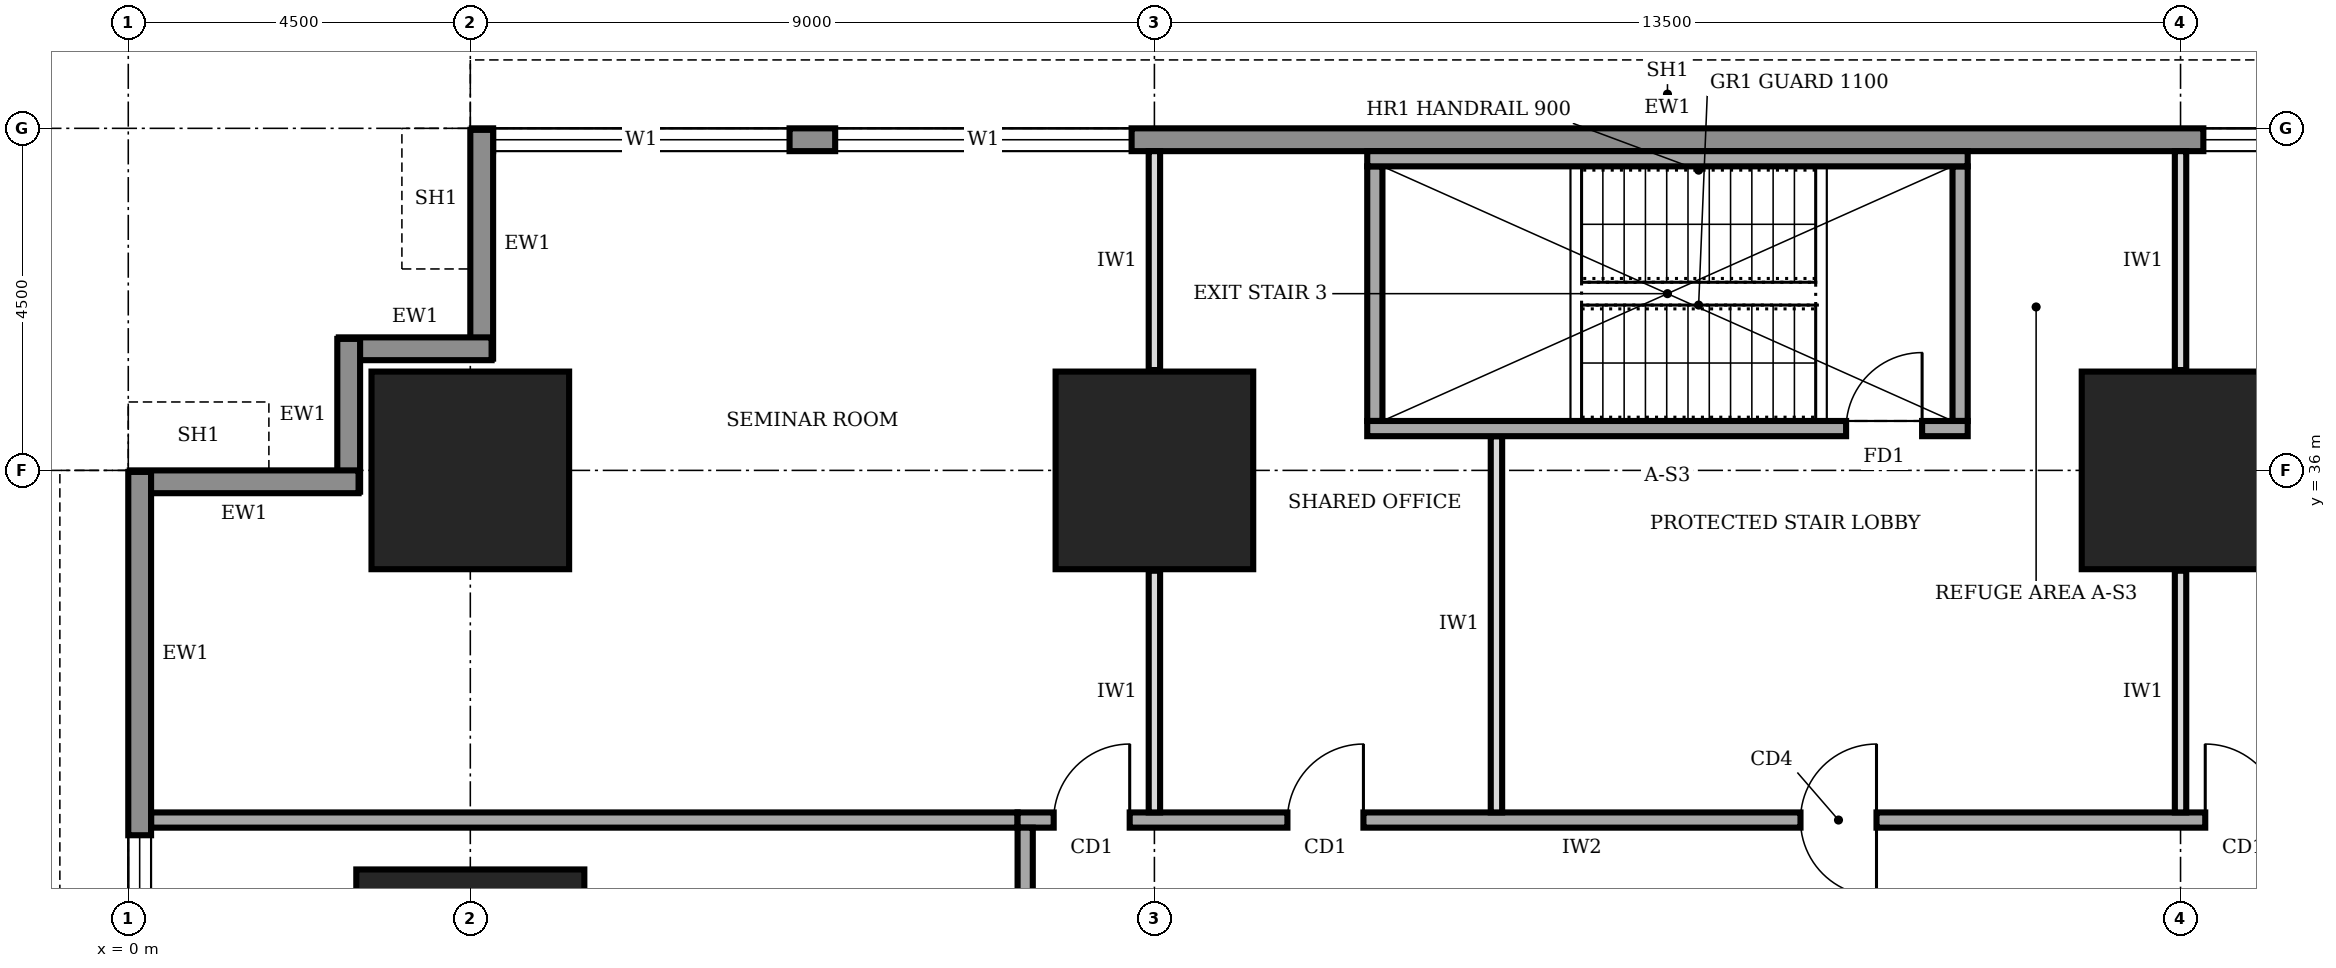
"""IFC4 building model, lengths in metres.
Left out: names, types, materials, properties, quantities, classifications, styles, units other than length and angle.
Written with IfcOpenShell. Run it as: python <this file> out.ifc"""

import sys

from ifc_helpers import new_model, si_unit, direction, frame, frame_2d, origin, origin_2d, place, context, subcontext, project, spatial, rectangle, extrude, element, fill, save


model = new_model("IFC4")
c1 = context("Model", 3, precision=1e-05, world=origin(), true_north=direction((0.0, 1.0)))
c2 = subcontext(c1, "Body", "Model", "MODEL_VIEW")
j1 = project(units=[si_unit("LENGTHUNIT", "METRE"), si_unit("PLANEANGLEUNIT", "RADIAN")], contexts=[c1])
p1 = place(None, origin())
s1 = spatial("IfcSite", under=j1, at=p1, CompositionType="ELEMENT")
p2 = place(p1, origin())
s2 = spatial("IfcBuilding", under=s1, at=p2, CompositionType="ELEMENT")
p3 = place(p2, frame((0.0, 0.0, 29.0)))
s3 = spatial("IfcBuildingStorey", under=s2, at=p3, CompositionType="ELEMENT", Elevation=29.0)
p4 = place(p3, frame((4.5, 29.25, 0.0), z_axis=(0.0, 0.0, 1.0), x_axis=(1.0, 0.0, 0.0)))
e1 = element("IfcColumn", 1, at=p4, inside=s3, PredefinedType="COLUMN", context=c2, shape_type="SweptSolid", body=[
    extrude(rectangle(XDim=3.0, YDim=3.0, at=origin_2d()), origin(), (0.0, 0.0, 1.0), 4.0),
])
for number, where, z_axis, x_axis in (
    (2, (4.5, 36.0, 0.0), (0.0, 0.0, 1.0), (1.0, 0.0, 0.0)),
    (3, (13.5, 36.0, 0.0), (0.0, 0.0, 1.0), (1.0, 0.0, 0.0)),
    (4, (27.0, 36.0, 0.0), (0.0, 0.0, 1.0), (1.0, 0.0, 0.0)),
):
    element("IfcColumn", number, at=place(p3, frame(where, z_axis=z_axis, x_axis=x_axis)), inside=s3, PredefinedType="COLUMN", context=c2, shape_type="SweptSolid", body=[
        extrude(rectangle(XDim=2.6, YDim=2.6, at=origin_2d()), origin(), (0.0, 0.0, 1.0), 4.0),
    ])
p5 = place(p3, frame((35.98, 40.35, 0.0), z_axis=(0.0, 0.0, 1.0), x_axis=(-1.0, 0.0, 0.0)))
e5 = element("IfcWall", 5, at=p5, inside=s3, PredefinedType="STANDARD", context=c2, shape_type="SweptSolid", body=[
    extrude(rectangle(XDim=31.46, YDim=0.3, at=frame_2d((15.73, 0.0))), origin(), (0.0, 0.0, 1.0), 3.75),
])
p6 = place(p5, frame((27.28, 0.0, 0.9)))
e6 = element("IfcOpeningElement", 6, at=p6, cuts=e5, PredefinedType="OPENING", context=c2, shape_type="SweptSolid", body=[
    extrude(rectangle(XDim=3.9, YDim=2.2, at=frame_2d((1.95, 1.1))), frame((0.0, 0.16, 0.0), z_axis=(0.0, -1.0, 0.0), x_axis=(1.0, 0.0, 0.0)), (0.0, 0.0, 1.0), 0.32),
])
p7 = place(p5, frame((22.78, 0.0, 0.9)))
e7 = element("IfcOpeningElement", 7, at=p7, cuts=e5, PredefinedType="OPENING", context=c2, shape_type="SweptSolid", body=[
    extrude(rectangle(XDim=3.9, YDim=2.2, at=frame_2d((1.95, 1.1))), frame((0.0, 0.16, 0.0), z_axis=(0.0, -1.0, 0.0), x_axis=(1.0, 0.0, 0.0)), (0.0, 0.0, 1.0), 0.32),
])
p8 = place(p5, frame((4.78, 0.0, 0.9)))
e8 = element("IfcOpeningElement", 8, at=p8, cuts=e5, PredefinedType="OPENING", context=c2, shape_type="SweptSolid", body=[
    extrude(rectangle(XDim=3.9, YDim=2.2, at=frame_2d((1.95, 1.1))), frame((0.0, 0.16, 0.0), z_axis=(0.0, -1.0, 0.0), x_axis=(1.0, 0.0, 0.0)), (0.0, 0.0, 1.0), 0.32),
])
p9 = place(p3, frame((4.65, 40.48, 0.0), z_axis=(0.0, 0.0, 1.0), x_axis=(0.0, -1.0, 0.0)))
e9 = element("IfcWall", 9, at=p9, inside=s3, PredefinedType="STANDARD", context=c2, shape_type="SweptSolid", body=[
    extrude(rectangle(XDim=3.01, YDim=0.3, at=frame_2d((1.505, 0.0))), origin(), (0.0, 0.0, 1.0), 2.85),
])
for number, where, z_axis, x_axis in (
    (10, (4.78, 37.6, 0.0), (0.0, 0.0, 1.0), (-1.0, 0.0, 0.0)),
    (11, (2.9, 37.73, 0.0), (0.0, 0.0, 1.0), (0.0, -1.0, 0.0)),
):
    element("IfcWall", number, at=place(p3, frame(where, z_axis=z_axis, x_axis=x_axis)), inside=s3, PredefinedType="STANDARD", context=c2, shape_type="SweptSolid", body=[
        extrude(rectangle(XDim=2.01, YDim=0.3, at=frame_2d((1.005, 0.0))), origin(), (0.0, 0.0, 1.0), 3.75),
    ])
p10 = place(p3, frame((3.03, 35.85, 0.0), z_axis=(0.0, 0.0, 1.0), x_axis=(-1.0, 0.0, 0.0)))
e12 = element("IfcWall", 12, at=p10, inside=s3, PredefinedType="STANDARD", context=c2, shape_type="SweptSolid", body=[
    extrude(rectangle(XDim=3.01, YDim=0.3, at=frame_2d((1.505, 0.0))), origin(), (0.0, 0.0, 1.0), 2.85),
])
p11 = place(p3, frame((0.15, 35.98, 0.0), z_axis=(0.0, 0.0, 1.0), x_axis=(0.0, -1.0, 0.0)))
e13 = element("IfcWall", 13, at=p11, inside=s3, PredefinedType="STANDARD", context=c2, shape_type="SweptSolid", body=[
    extrude(rectangle(XDim=31.46, YDim=0.3, at=frame_2d((15.73, 0.0))), origin(), (0.0, 0.0, 1.0), 3.75),
])
p12 = place(p11, frame((27.28, 0.0, 0.9)))
e14 = element("IfcOpeningElement", 14, at=p12, cuts=e13, PredefinedType="OPENING", context=c2, shape_type="SweptSolid", body=[
    extrude(rectangle(XDim=3.9, YDim=2.2, at=frame_2d((1.95, 1.1))), frame((0.0, 0.16, 0.0), z_axis=(0.0, -1.0, 0.0), x_axis=(1.0, 0.0, 0.0)), (0.0, 0.0, 1.0), 0.32),
])
p13 = place(p11, frame((22.78, 0.0, 0.9)))
e15 = element("IfcOpeningElement", 15, at=p13, cuts=e13, PredefinedType="OPENING", context=c2, shape_type="SweptSolid", body=[
    extrude(rectangle(XDim=3.9, YDim=2.2, at=frame_2d((1.95, 1.1))), frame((0.0, 0.16, 0.0), z_axis=(0.0, -1.0, 0.0), x_axis=(1.0, 0.0, 0.0)), (0.0, 0.0, 1.0), 0.32),
])
p14 = place(p11, frame((18.28, 0.0, 0.9)))
e16 = element("IfcOpeningElement", 16, at=p14, cuts=e13, PredefinedType="OPENING", context=c2, shape_type="SweptSolid", body=[
    extrude(rectangle(XDim=3.9, YDim=2.2, at=frame_2d((1.95, 1.1))), frame((0.0, 0.16, 0.0), z_axis=(0.0, -1.0, 0.0), x_axis=(1.0, 0.0, 0.0)), (0.0, 0.0, 1.0), 0.32),
])
p15 = place(p11, frame((13.78, 0.0, 0.9)))
e17 = element("IfcOpeningElement", 17, at=p15, cuts=e13, PredefinedType="OPENING", context=c2, shape_type="SweptSolid", body=[
    extrude(rectangle(XDim=3.9, YDim=2.2, at=frame_2d((1.95, 1.1))), frame((0.0, 0.16, 0.0), z_axis=(0.0, -1.0, 0.0), x_axis=(1.0, 0.0, 0.0)), (0.0, 0.0, 1.0), 0.32),
])
p16 = place(p11, frame((9.28, 0.0, 0.9)))
e18 = element("IfcOpeningElement", 18, at=p16, cuts=e13, PredefinedType="OPENING", context=c2, shape_type="SweptSolid", body=[
    extrude(rectangle(XDim=3.9, YDim=2.2, at=frame_2d((1.95, 1.1))), frame((0.0, 0.16, 0.0), z_axis=(0.0, -1.0, 0.0), x_axis=(1.0, 0.0, 0.0)), (0.0, 0.0, 1.0), 0.32),
])
p17 = place(p11, frame((4.78, 0.0, 0.9)))
e19 = element("IfcOpeningElement", 19, at=p17, cuts=e13, PredefinedType="OPENING", context=c2, shape_type="SweptSolid", body=[
    extrude(rectangle(XDim=3.9, YDim=2.2, at=frame_2d((1.95, 1.1))), frame((0.0, 0.16, 0.0), z_axis=(0.0, -1.0, 0.0), x_axis=(1.0, 0.0, 0.0)), (0.0, 0.0, 1.0), 0.32),
])
p18 = place(p3, frame((28.6, 31.4, 0.0), z_axis=(0.0, 0.0, 1.0), x_axis=(-1.0, 0.0, 0.0)))
e20 = element("IfcWall", 20, at=p18, inside=s3, PredefinedType="SOLIDWALL", context=c2, shape_type="SweptSolid", body=[
    extrude(rectangle(XDim=16.9, YDim=0.2, at=frame_2d((8.45, 0.0))), origin(), (0.0, 0.0, 1.0), 3.75),
])
p19 = place(p18, frame((15.425, 0.0, 0.0)))
e21 = element("IfcOpeningElement", 21, at=p19, cuts=e20, PredefinedType="OPENING", context=c2, shape_type="SweptSolid", body=[
    extrude(rectangle(XDim=1.0, YDim=2.1, at=frame_2d((0.5, 1.05))), frame((0.0, 0.11, 0.0), z_axis=(0.0, -1.0, 0.0), x_axis=(1.0, 0.0, 0.0)), (0.0, 0.0, 1.0), 0.22),
])
p20 = place(p18, frame((12.35, 0.0, 0.0)))
e22 = element("IfcOpeningElement", 22, at=p20, cuts=e20, PredefinedType="OPENING", context=c2, shape_type="SweptSolid", body=[
    extrude(rectangle(XDim=1.0, YDim=2.1, at=frame_2d((0.5, 1.05))), frame((0.0, 0.11, 0.0), z_axis=(0.0, -1.0, 0.0), x_axis=(1.0, 0.0, 0.0)), (0.0, 0.0, 1.0), 0.22),
])
p21 = place(p18, frame((5.6, 0.0, 0.0)))
e23 = element("IfcOpeningElement", 23, at=p21, cuts=e20, PredefinedType="OPENING", context=c2, shape_type="SweptSolid", body=[
    extrude(rectangle(XDim=1.0, YDim=2.1, at=frame_2d((0.5, 1.05))), frame((0.0, 0.11, 0.0), z_axis=(0.0, -1.0, 0.0), x_axis=(1.0, 0.0, 0.0)), (0.0, 0.0, 1.0), 0.22),
])
p22 = place(p18, frame((0.275, 0.0, 0.0)))
e24 = element("IfcOpeningElement", 24, at=p22, cuts=e20, PredefinedType="OPENING", context=c2, shape_type="SweptSolid", body=[
    extrude(rectangle(XDim=1.0, YDim=2.1, at=frame_2d((0.5, 1.05))), frame((0.0, 0.11, 0.0), z_axis=(0.0, -1.0, 0.0), x_axis=(1.0, 0.0, 0.0)), (0.0, 0.0, 1.0), 0.22),
])
p23 = place(p3, frame((11.8, 31.3, 0.0), z_axis=(0.0, 0.0, 1.0), x_axis=(0.0, -1.0, 0.0)))
e25 = element("IfcWall", 25, at=p23, inside=s3, PredefinedType="SOLIDWALL", context=c2, shape_type="SweptSolid", body=[
    extrude(rectangle(XDim=23.8, YDim=0.2, at=frame_2d((11.9, 0.0))), origin(), (0.0, 0.0, 1.0), 3.75),
])
p24 = place(p23, frame((20.3, 0.0, 0.0)))
e26 = element("IfcOpeningElement", 26, at=p24, cuts=e25, PredefinedType="OPENING", context=c2, shape_type="SweptSolid", body=[
    extrude(rectangle(XDim=1.0, YDim=2.1, at=frame_2d((0.5, 1.05))), frame((0.0, 0.11, 0.0), z_axis=(0.0, -1.0, 0.0), x_axis=(1.0, 0.0, 0.0)), (0.0, 0.0, 1.0), 0.22),
])
p25 = place(p23, frame((16.2, 0.0, 0.0)))
e27 = element("IfcOpeningElement", 27, at=p25, cuts=e25, PredefinedType="OPENING", context=c2, shape_type="SweptSolid", body=[
    extrude(rectangle(XDim=1.0, YDim=2.1, at=frame_2d((0.5, 1.05))), frame((0.0, 0.11, 0.0), z_axis=(0.0, -1.0, 0.0), x_axis=(1.0, 0.0, 0.0)), (0.0, 0.0, 1.0), 0.22),
])
p26 = place(p23, frame((13.2, 0.0, 0.0)))
e28 = element("IfcOpeningElement", 28, at=p26, cuts=e25, PredefinedType="OPENING", context=c2, shape_type="SweptSolid", body=[
    extrude(rectangle(XDim=0.9, YDim=2.1, at=frame_2d((0.45, 1.05))), frame((0.0, 0.11, 0.0), z_axis=(0.0, -1.0, 0.0), x_axis=(1.0, 0.0, 0.0)), (0.0, 0.0, 1.0), 0.22),
])
p27 = place(p23, frame((10.15, 0.0, 0.0)))
e29 = element("IfcOpeningElement", 29, at=p27, cuts=e25, PredefinedType="OPENING", context=c2, shape_type="SweptSolid", body=[
    extrude(rectangle(XDim=0.9, YDim=2.1, at=frame_2d((0.45, 1.05))), frame((0.0, 0.11, 0.0), z_axis=(0.0, -1.0, 0.0), x_axis=(1.0, 0.0, 0.0)), (0.0, 0.0, 1.0), 0.22),
])
p28 = place(p23, frame((5.45, 0.0, 0.0)))
e30 = element("IfcOpeningElement", 30, at=p28, cuts=e25, PredefinedType="OPENING", context=c2, shape_type="SweptSolid", body=[
    extrude(rectangle(XDim=0.9, YDim=2.1, at=frame_2d((0.45, 1.05))), frame((0.0, 0.11, 0.0), z_axis=(0.0, -1.0, 0.0), x_axis=(1.0, 0.0, 0.0)), (0.0, 0.0, 1.0), 0.22),
])
p29 = place(p23, frame((8.0, 0.0, 0.0)))
e31 = element("IfcOpeningElement", 31, at=p29, cuts=e25, PredefinedType="OPENING", context=c2, shape_type="SweptSolid", body=[
    extrude(rectangle(XDim=1.0, YDim=2.1, at=frame_2d((0.5, 1.05))), frame((0.0, 0.11, 0.0), z_axis=(0.0, -1.0, 0.0), x_axis=(1.0, 0.0, 0.0)), (0.0, 0.0, 1.0), 0.22),
])
p30 = place(p23, frame((1.55, 0.0, 0.0)))
e32 = element("IfcOpeningElement", 32, at=p30, cuts=e25, PredefinedType="OPENING", context=c2, shape_type="SweptSolid", body=[
    extrude(rectangle(XDim=1.0, YDim=2.1, at=frame_2d((0.5, 1.05))), frame((0.0, 0.11, 0.0), z_axis=(0.0, -1.0, 0.0), x_axis=(1.0, 0.0, 0.0)), (0.0, 0.0, 1.0), 0.22),
])
p31 = place(p3, frame((0.3, 31.4, 0.0), z_axis=(0.0, 0.0, 1.0), x_axis=(1.0, 0.0, 0.0)))
e33 = element("IfcWall", 33, at=p31, inside=s3, PredefinedType="SOLIDWALL", context=c2, shape_type="SweptSolid", body=[
    extrude(rectangle(XDim=11.4, YDim=0.2, at=frame_2d((5.7, 0.0))), origin(), (0.0, 0.0, 1.0), 3.75),
])
p32 = place(p3, frame((13.5, 31.5, 0.0), z_axis=(0.0, 0.0, 1.0), x_axis=(0.0, 1.0, 0.0)))
e34 = element("IfcWall", 34, at=p32, inside=s3, PredefinedType="PARTITIONING", context=c2, shape_type="SweptSolid", body=[
    extrude(rectangle(XDim=3.18, YDim=0.15, at=frame_2d((1.59, 0.0))), origin(), (0.0, 0.0, 1.0), 2.85),
])
p33 = place(p3, frame((13.5, 37.32, 0.0), z_axis=(0.0, 0.0, 1.0), x_axis=(0.0, 1.0, 0.0)))
e35 = element("IfcWall", 35, at=p33, inside=s3, PredefinedType="PARTITIONING", context=c2, shape_type="SweptSolid", body=[
    extrude(rectangle(XDim=2.88, YDim=0.15, at=frame_2d((1.44, 0.0))), origin(), (0.0, 0.0, 1.0), 2.85),
])
p34 = place(p3, frame((18.0, 31.5, 0.0), z_axis=(0.0, 0.0, 1.0), x_axis=(0.0, 1.0, 0.0)))
e36 = element("IfcWall", 36, at=p34, inside=s3, PredefinedType="PARTITIONING", context=c2, shape_type="SweptSolid", body=[
    extrude(rectangle(XDim=4.95, YDim=0.15, at=frame_2d((2.475, 0.0))), origin(), (0.0, 0.0, 1.0), 3.75),
])
p35 = place(p3, frame((27.0, 31.5, 0.0), z_axis=(0.0, 0.0, 1.0), x_axis=(0.0, 1.0, 0.0)))
e37 = element("IfcWall", 37, at=p35, inside=s3, PredefinedType="PARTITIONING", context=c2, shape_type="SweptSolid", body=[
    extrude(rectangle(XDim=3.18, YDim=0.15, at=frame_2d((1.59, 0.0))), origin(), (0.0, 0.0, 1.0), 2.85),
])
p36 = place(p3, frame((27.0, 37.32, 0.0), z_axis=(0.0, 0.0, 1.0), x_axis=(0.0, 1.0, 0.0)))
e38 = element("IfcWall", 38, at=p36, inside=s3, PredefinedType="PARTITIONING", context=c2, shape_type="SweptSolid", body=[
    extrude(rectangle(XDim=2.88, YDim=0.15, at=frame_2d((1.44, 0.0))), origin(), (0.0, 0.0, 1.0), 2.85),
])
p37 = place(p3, frame((16.3, 36.55, 0.0), z_axis=(0.0, 0.0, 1.0), x_axis=(1.0, 0.0, 0.0)))
e39 = element("IfcWall", 39, at=p37, inside=s3, PredefinedType="SOLIDWALL", context=c2, shape_type="SweptSolid", body=[
    extrude(rectangle(XDim=7.9, YDim=0.2, at=frame_2d((3.95, 0.0))), origin(), (0.0, 0.0, 1.0), 3.75),
])
p38 = place(p37, frame((6.3, 0.0, 0.0)))
e40 = element("IfcOpeningElement", 40, at=p38, cuts=e39, PredefinedType="OPENING", context=c2, shape_type="SweptSolid", body=[
    extrude(rectangle(XDim=1.0, YDim=2.1, at=frame_2d((0.5, 1.05))), frame((0.0, 0.11, 0.0), z_axis=(0.0, -1.0, 0.0), x_axis=(1.0, 0.0, 0.0)), (0.0, 0.0, 1.0), 0.22),
])
p39 = place(p3, frame((16.3, 40.1, 0.0), z_axis=(0.0, 0.0, 1.0), x_axis=(1.0, 0.0, 0.0)))
e41 = element("IfcWall", 41, at=p39, inside=s3, PredefinedType="SOLIDWALL", context=c2, shape_type="SweptSolid", body=[
    extrude(rectangle(XDim=7.9, YDim=0.2, at=frame_2d((3.95, 0.0))), origin(), (0.0, 0.0, 1.0), 3.75),
])
for number, where, z_axis, x_axis in (
    (42, (16.4, 36.65, 0.0), (0.0, 0.0, 1.0), (0.0, 1.0, 0.0)),
    (43, (24.1, 36.65, 0.0), (0.0, 0.0, 1.0), (0.0, 1.0, 0.0)),
):
    element("IfcWall", number, at=place(p3, frame(where, z_axis=z_axis, x_axis=x_axis)), inside=s3, PredefinedType="SOLIDWALL", context=c2, shape_type="SweptSolid", body=[
        extrude(rectangle(XDim=3.35, YDim=0.2, at=frame_2d((1.675, 0.0))), origin(), (0.0, 0.0, 1.0), 3.75),
    ])
p40 = place(p6, origin())
e44 = element("IfcWindow", 44, at=p40, inside=s3, PartitioningType="SINGLE_PANEL", PredefinedType="WINDOW", context=c2, shape_type="SweptSolid", body=[
    extrude(rectangle(XDim=3.9, YDim=2.2, at=frame_2d((1.95, 1.1))), frame((0.0, 0.03, 0.0), z_axis=(0.0, -1.0, 0.0), x_axis=(1.0, 0.0, 0.0)), (0.0, 0.0, 1.0), 0.06),
])
fill(e6, e44)
p41 = place(p7, origin())
e45 = element("IfcWindow", 45, at=p41, inside=s3, PartitioningType="SINGLE_PANEL", PredefinedType="WINDOW", context=c2, shape_type="SweptSolid", body=[
    extrude(rectangle(XDim=3.9, YDim=2.2, at=frame_2d((1.95, 1.1))), frame((0.0, 0.03, 0.0), z_axis=(0.0, -1.0, 0.0), x_axis=(1.0, 0.0, 0.0)), (0.0, 0.0, 1.0), 0.06),
])
fill(e7, e45)
p42 = place(p8, origin())
e46 = element("IfcWindow", 46, at=p42, inside=s3, PartitioningType="SINGLE_PANEL", PredefinedType="WINDOW", context=c2, shape_type="SweptSolid", body=[
    extrude(rectangle(XDim=3.9, YDim=2.2, at=frame_2d((1.95, 1.1))), frame((0.0, 0.03, 0.0), z_axis=(0.0, -1.0, 0.0), x_axis=(1.0, 0.0, 0.0)), (0.0, 0.0, 1.0), 0.06),
])
fill(e8, e46)
p43 = place(p17, origin())
e47 = element("IfcWindow", 47, at=p43, inside=s3, PartitioningType="SINGLE_PANEL", PredefinedType="WINDOW", context=c2, shape_type="SweptSolid", body=[
    extrude(rectangle(XDim=3.9, YDim=2.2, at=frame_2d((1.95, 1.1))), frame((0.0, 0.03, 0.0), z_axis=(0.0, -1.0, 0.0), x_axis=(1.0, 0.0, 0.0)), (0.0, 0.0, 1.0), 0.06),
])
fill(e19, e47)
p44 = place(p19, frame((1.0, 0.0, 0.0), z_axis=(0.0, 0.0, 1.0), x_axis=(-1.0, 0.0, 0.0)))
e48 = element("IfcDoor", 48, at=p44, inside=s3, OperationType="SINGLE_SWING_RIGHT", PredefinedType="DOOR", context=c2, shape_type="SweptSolid", body=[
    extrude(rectangle(XDim=1.0, YDim=2.1, at=frame_2d((0.5, 1.05))), frame((0.0, 0.025, 0.0), z_axis=(0.0, -1.0, 0.0), x_axis=(1.0, 0.0, 0.0)), (0.0, 0.0, 1.0), 0.05),
])
fill(e21, e48)
p45 = place(p20, frame((1.0, 0.0, 0.0), z_axis=(0.0, 0.0, 1.0), x_axis=(-1.0, 0.0, 0.0)))
e49 = element("IfcDoor", 49, at=p45, inside=s3, OperationType="SINGLE_SWING_RIGHT", PredefinedType="DOOR", context=c2, shape_type="SweptSolid", body=[
    extrude(rectangle(XDim=1.0, YDim=2.1, at=frame_2d((0.5, 1.05))), frame((0.0, 0.025, 0.0), z_axis=(0.0, -1.0, 0.0), x_axis=(1.0, 0.0, 0.0)), (0.0, 0.0, 1.0), 0.05),
])
fill(e22, e49)
p46 = place(p21, origin())
e50 = element("IfcDoor", 50, at=p46, inside=s3, OperationType="DOUBLE_SWING_LEFT", PredefinedType="DOOR", context=c2, shape_type="SweptSolid", body=[
    extrude(rectangle(XDim=1.0, YDim=2.1, at=frame_2d((0.5, 1.05))), frame((0.0, 0.025, 0.0), z_axis=(0.0, -1.0, 0.0), x_axis=(1.0, 0.0, 0.0)), (0.0, 0.0, 1.0), 0.05),
])
fill(e23, e50)
p47 = place(p22, frame((1.0, 0.0, 0.0), z_axis=(0.0, 0.0, 1.0), x_axis=(-1.0, 0.0, 0.0)))
e51 = element("IfcDoor", 51, at=p47, inside=s3, OperationType="SINGLE_SWING_LEFT", PredefinedType="DOOR", context=c2, shape_type="SweptSolid", body=[
    extrude(rectangle(XDim=1.0, YDim=2.1, at=frame_2d((0.5, 1.05))), frame((0.0, 0.025, 0.0), z_axis=(0.0, -1.0, 0.0), x_axis=(1.0, 0.0, 0.0)), (0.0, 0.0, 1.0), 0.05),
])
fill(e24, e51)
p48 = place(p38, origin())
e52 = element("IfcDoor", 52, at=p48, inside=s3, OperationType="SINGLE_SWING_RIGHT", PredefinedType="DOOR", context=c2, shape_type="SweptSolid", body=[
    extrude(rectangle(XDim=1.0, YDim=2.1, at=frame_2d((0.5, 1.05))), frame((0.0, 0.025, 0.0), z_axis=(0.0, -1.0, 0.0), x_axis=(1.0, 0.0, 0.0)), (0.0, 0.0, 1.0), 0.05),
])
fill(e40, e52)
save(model, sys.argv[1])
